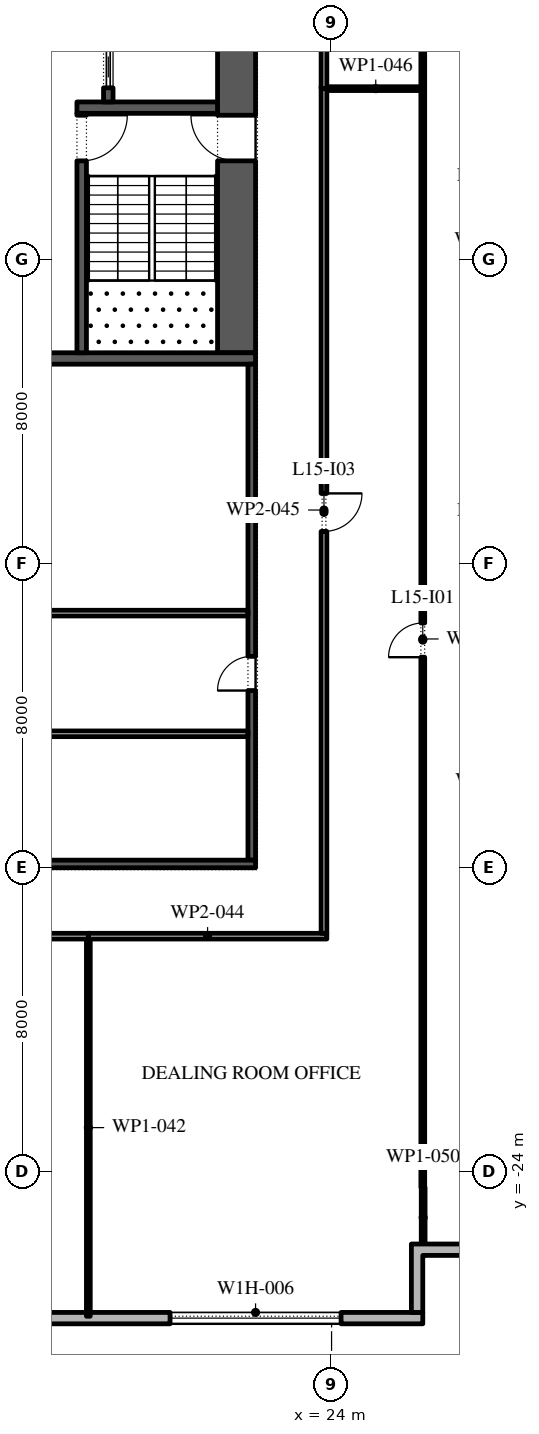
"""IFC4 building model, lengths in metres.
Left out: names, types, materials, properties, quantities, classifications, styles, units other than length and angle.
Written with IfcOpenShell. Run it as: python <this file> out.ifc"""

import sys

from ifc_helpers import new_model, si_unit, direction, frame, frame_2d, origin, place, context, subcontext, project, spatial, polyline, rectangle, outline, extrude, element, fill, save


model = new_model("IFC4")
c1 = context("Model", 3, precision=1e-05, world=origin(), true_north=direction((0.0, 1.0)))
c2 = subcontext(c1, "Body", "Model", "MODEL_VIEW")
j1 = project(units=[si_unit("LENGTHUNIT", "METRE"), si_unit("PLANEANGLEUNIT", "RADIAN")], contexts=[c1])
p1 = place(None, origin())
s1 = spatial("IfcSite", under=j1, at=p1, CompositionType="ELEMENT")
p2 = place(p1, origin())
s2 = spatial("IfcBuilding", under=s1, at=p2, CompositionType="ELEMENT")
p3 = place(p2, frame((0.0, 0.0, 73.2)))
s3 = spatial("IfcBuildingStorey", under=s2, at=p3, CompositionType="ELEMENT", Elevation=73.2)
p4 = place(p3, frame((-26.1, -27.85, 0.0), z_axis=(0.0, 0.0, 1.0), x_axis=(1.0, 0.0, 0.0)))
e1 = element("IfcWall", 1, at=p4, inside=s3, PredefinedType="STANDARD", context=c2, shape_type="SweptSolid", body=[
    extrude(rectangle(XDim=52.5, YDim=0.3, at=frame_2d((26.25, 0.0))), origin(), (0.0, 0.0, 1.0), 4.0),
])
p5 = place(p4, frame((2.0, 0.0, 0.45)))
e2 = element("IfcOpeningElement", 2, at=p5, cuts=e1, PredefinedType="OPENING", context=c2, shape_type="SweptSolid", body=[
    extrude(rectangle(XDim=4.5, YDim=2.75, at=frame_2d((2.25, 1.375))), frame((0.0, 0.16, 0.0), z_axis=(0.0, -1.0, 0.0), x_axis=(1.0, 0.0, 0.0)), (0.0, 0.0, 1.0), 0.32),
])
p6 = place(p4, frame((10.65, 0.0, 0.45)))
e3 = element("IfcOpeningElement", 3, at=p6, cuts=e1, PredefinedType="OPENING", context=c2, shape_type="SweptSolid", body=[
    extrude(rectangle(XDim=4.5, YDim=2.75, at=frame_2d((2.25, 1.375))), frame((0.0, 0.16, 0.0), z_axis=(0.0, -1.0, 0.0), x_axis=(1.0, 0.0, 0.0)), (0.0, 0.0, 1.0), 0.32),
])
p7 = place(p4, frame((20.5, 0.0, 0.0)))
e4 = element("IfcOpeningElement", 4, at=p7, cuts=e1, PredefinedType="OPENING", context=c2, shape_type="SweptSolid", body=[
    extrude(rectangle(XDim=2.4, YDim=3.5, at=frame_2d((1.2, 1.75))), frame((0.0, 0.16, 0.0), z_axis=(0.0, -1.0, 0.0), x_axis=(1.0, 0.0, 0.0)), (0.0, 0.0, 1.0), 0.32),
])
p8 = place(p4, frame((28.25, 0.0, 0.45)))
e5 = element("IfcOpeningElement", 5, at=p8, cuts=e1, PredefinedType="OPENING", context=c2, shape_type="SweptSolid", body=[
    extrude(rectangle(XDim=4.5, YDim=2.75, at=frame_2d((2.25, 1.375))), frame((0.0, 0.16, 0.0), z_axis=(0.0, -1.0, 0.0), x_axis=(1.0, 0.0, 0.0)), (0.0, 0.0, 1.0), 0.32),
])
p9 = place(p4, frame((37.05, 0.0, 0.45)))
e6 = element("IfcOpeningElement", 6, at=p9, cuts=e1, PredefinedType="OPENING", context=c2, shape_type="SweptSolid", body=[
    extrude(rectangle(XDim=4.5, YDim=2.75, at=frame_2d((2.25, 1.375))), frame((0.0, 0.16, 0.0), z_axis=(0.0, -1.0, 0.0), x_axis=(1.0, 0.0, 0.0)), (0.0, 0.0, 1.0), 0.32),
])
p10 = place(p4, frame((45.85, 0.0, 0.45)))
e7 = element("IfcOpeningElement", 7, at=p10, cuts=e1, PredefinedType="OPENING", context=c2, shape_type="SweptSolid", body=[
    extrude(rectangle(XDim=4.5, YDim=2.75, at=frame_2d((2.25, 1.375))), frame((0.0, 0.16, 0.0), z_axis=(0.0, -1.0, 0.0), x_axis=(1.0, 0.0, 0.0)), (0.0, 0.0, 1.0), 0.32),
])
p11 = place(p3, origin())
e8 = element("IfcWall", 8, at=p11, inside=s3, PredefinedType="STANDARD", context=c2, shape_type="SweptSolid", body=[
    extrude(outline(polyline([(27.9, -25.9), (27.9, -24.1), (30.0, -24.1), (30.0, -24.4), (28.2, -24.4), (28.2, -26.2), (26.4, -26.2), (26.4, -27.7), (26.1, -27.7), (26.1, -25.9), (27.9, -25.9)])), origin(), (0.0, 0.0, 1.0), 4.0),
])
p12 = place(p3, frame((21.5, -2.45, 0.0), z_axis=(0.0, 0.0, 1.0), x_axis=(0.0, 1.0, 0.0)))
e9 = element("IfcWall", 9, at=p12, inside=s3, PredefinedType="SHEAR", context=c2, shape_type="SweptSolid", body=[
    extrude(rectangle(XDim=27.9, YDim=1.0, at=frame_2d((13.95, 0.0))), origin(), (0.0, 0.0, 1.0), 4.0),
])
p13 = place(p12, frame((5.05, 0.0, 0.0)))
e10 = element("IfcOpeningElement", 10, at=p13, cuts=e9, PredefinedType="OPENING", context=c2, shape_type="SweptSolid", body=[
    extrude(rectangle(XDim=1.2, YDim=2.1, at=frame_2d((0.6, 1.05))), frame((0.0, 0.51, 0.0), z_axis=(0.0, -1.0, 0.0), x_axis=(1.0, 0.0, 0.0)), (0.0, 0.0, 1.0), 1.02),
])
p14 = place(p12, frame((21.65, 0.0, 0.0)))
e11 = element("IfcOpeningElement", 11, at=p14, cuts=e9, PredefinedType="OPENING", context=c2, shape_type="SweptSolid", body=[
    extrude(rectangle(XDim=1.2, YDim=2.1, at=frame_2d((0.6, 1.05))), frame((0.0, 0.51, 0.0), z_axis=(0.0, -1.0, 0.0), x_axis=(1.0, 0.0, 0.0)), (0.0, 0.0, 1.0), 1.02),
])
p15 = place(p3, frame((10.0, -2.6, 0.0), z_axis=(0.0, 0.0, 1.0), x_axis=(1.0, 0.0, 0.0)))
e12 = element("IfcWall", 12, at=p15, inside=s3, PredefinedType="SHEAR", context=c2, shape_type="SweptSolid", body=[
    extrude(rectangle(XDim=12.0, YDim=0.3, at=frame_2d((6.0, 0.0))), origin(), (0.0, 0.0, 1.0), 4.0),
])
p16 = place(p3, frame((17.3, 4.0, 0.0), z_axis=(0.0, 0.0, 1.0), x_axis=(1.0, 0.0, 0.0)))
e13 = element("IfcWall", 13, at=p16, inside=s3, PredefinedType="SHEAR", context=c2, shape_type="SweptSolid", body=[
    extrude(rectangle(XDim=3.7, YDim=0.3, at=frame_2d((1.85, 0.0))), origin(), (0.0, 0.0, 1.0), 4.0),
])
p17 = place(p3, frame((17.425, -2.45, 0.0), z_axis=(0.0, 0.0, 1.0), x_axis=(0.0, 1.0, 0.0)))
e14 = element("IfcWall", 14, at=p17, inside=s3, PredefinedType="SHEAR", context=c2, shape_type="SweptSolid", body=[
    extrude(rectangle(XDim=6.3, YDim=0.25, at=frame_2d((3.15, 0.0))), origin(), (0.0, 0.0, 1.0), 4.0),
])
p18 = place(p17, frame((5.05, 0.0, 0.0)))
e15 = element("IfcOpeningElement", 15, at=p18, cuts=e14, PredefinedType="OPENING", context=c2, shape_type="SweptSolid", body=[
    extrude(rectangle(XDim=1.2, YDim=2.1, at=frame_2d((0.6, 1.05))), frame((0.0, 0.135, 0.0), z_axis=(0.0, -1.0, 0.0), x_axis=(1.0, 0.0, 0.0)), (0.0, 0.0, 1.0), 0.27),
])
p19 = place(p3, frame((18.125, 4.15, 0.0), z_axis=(0.0, 0.0, 1.0), x_axis=(0.0, 1.0, 0.0)))
e16 = element("IfcWall", 16, at=p19, inside=s3, PredefinedType="SHEAR", context=c2, shape_type="SweptSolid", body=[
    extrude(rectangle(XDim=14.7, YDim=0.25, at=frame_2d((7.35, 0.0))), origin(), (0.0, 0.0, 1.0), 4.0),
])
p20 = place(p19, frame((0.371, 0.0, 0.0)))
e17 = element("IfcOpeningElement", 17, at=p20, cuts=e16, PredefinedType="OPENING", context=c2, shape_type="SweptSolid", body=[
    extrude(rectangle(XDim=1.1, YDim=2.1, at=frame_2d((0.55, 1.05))), frame((0.0, 0.135, 0.0), z_axis=(0.0, -1.0, 0.0), x_axis=(1.0, 0.0, 0.0)), (0.0, 0.0, 1.0), 0.27),
])
p21 = place(p19, frame((2.514, 0.0, 0.0)))
e18 = element("IfcOpeningElement", 18, at=p21, cuts=e16, PredefinedType="OPENING", context=c2, shape_type="SweptSolid", body=[
    extrude(rectangle(XDim=1.1, YDim=2.1, at=frame_2d((0.55, 1.05))), frame((0.0, 0.135, 0.0), z_axis=(0.0, -1.0, 0.0), x_axis=(1.0, 0.0, 0.0)), (0.0, 0.0, 1.0), 0.27),
])
p22 = place(p19, frame((4.657, 0.0, 0.0)))
e19 = element("IfcOpeningElement", 19, at=p22, cuts=e16, PredefinedType="OPENING", context=c2, shape_type="SweptSolid", body=[
    extrude(rectangle(XDim=1.1, YDim=2.1, at=frame_2d((0.55, 1.05))), frame((0.0, 0.135, 0.0), z_axis=(0.0, -1.0, 0.0), x_axis=(1.0, 0.0, 0.0)), (0.0, 0.0, 1.0), 0.27),
])
p23 = place(p19, frame((6.8, 0.0, 0.0)))
e20 = element("IfcOpeningElement", 20, at=p23, cuts=e16, PredefinedType="OPENING", context=c2, shape_type="SweptSolid", body=[
    extrude(rectangle(XDim=1.1, YDim=2.1, at=frame_2d((0.55, 1.05))), frame((0.0, 0.135, 0.0), z_axis=(0.0, -1.0, 0.0), x_axis=(1.0, 0.0, 0.0)), (0.0, 0.0, 1.0), 0.27),
])
p24 = place(p19, frame((8.943, 0.0, 0.0)))
e21 = element("IfcOpeningElement", 21, at=p24, cuts=e16, PredefinedType="OPENING", context=c2, shape_type="SweptSolid", body=[
    extrude(rectangle(XDim=1.1, YDim=2.1, at=frame_2d((0.55, 1.05))), frame((0.0, 0.135, 0.0), z_axis=(0.0, -1.0, 0.0), x_axis=(1.0, 0.0, 0.0)), (0.0, 0.0, 1.0), 0.27),
])
p25 = place(p19, frame((11.086, 0.0, 0.0)))
e22 = element("IfcOpeningElement", 22, at=p25, cuts=e16, PredefinedType="OPENING", context=c2, shape_type="SweptSolid", body=[
    extrude(rectangle(XDim=1.1, YDim=2.1, at=frame_2d((0.55, 1.05))), frame((0.0, 0.135, 0.0), z_axis=(0.0, -1.0, 0.0), x_axis=(1.0, 0.0, 0.0)), (0.0, 0.0, 1.0), 0.27),
])
p26 = place(p19, frame((13.229, 0.0, 0.0)))
e23 = element("IfcOpeningElement", 23, at=p26, cuts=e16, PredefinedType="OPENING", context=c2, shape_type="SweptSolid", body=[
    extrude(rectangle(XDim=1.1, YDim=2.1, at=frame_2d((0.55, 1.05))), frame((0.0, 0.135, 0.0), z_axis=(0.0, -1.0, 0.0), x_axis=(1.0, 0.0, 0.0)), (0.0, 0.0, 1.0), 0.27),
])
p27 = place(p3, frame((21.9, -15.8, 0.0), z_axis=(0.0, 0.0, 1.0), x_axis=(0.0, 1.0, 0.0)))
e24 = element("IfcWall", 24, at=p27, inside=s3, PredefinedType="SHEAR", context=c2, shape_type="SweptSolid", body=[
    extrude(rectangle(XDim=13.05, YDim=0.2, at=frame_2d((6.525, 0.0))), origin(), (0.0, 0.0, 1.0), 4.0),
])
p28 = place(p27, frame((4.462, 0.0, 0.0)))
e25 = element("IfcOpeningElement", 25, at=p28, cuts=e24, PredefinedType="OPENING", context=c2, shape_type="SweptSolid", body=[
    extrude(rectangle(XDim=0.9, YDim=2.1, at=frame_2d((0.45, 1.05))), frame((0.0, 0.11, 0.0), z_axis=(0.0, -1.0, 0.0), x_axis=(1.0, 0.0, 0.0)), (0.0, 0.0, 1.0), 0.22),
])
p29 = place(p3, frame((10.0, -15.9, 0.0), z_axis=(0.0, 0.0, 1.0), x_axis=(1.0, 0.0, 0.0)))
e26 = element("IfcWall", 26, at=p29, inside=s3, PredefinedType="SHEAR", context=c2, shape_type="SweptSolid", body=[
    extrude(rectangle(XDim=12.0, YDim=0.2, at=frame_2d((6.0, 0.0))), origin(), (0.0, 0.0, 1.0), 4.0),
])
for number, where, z_axis, x_axis in (
    (27, (10.2, -9.3, 0.0), (0.0, 0.0, 1.0), (1.0, 0.0, 0.0)),
    (28, (10.2, -12.475, 0.0), (0.0, 0.0, 1.0), (1.0, 0.0, 0.0)),
):
    element("IfcWall", number, at=place(p3, frame(where, z_axis=z_axis, x_axis=x_axis)), inside=s3, PredefinedType="PARTITIONING", context=c2, shape_type="SweptSolid", body=[
        extrude(rectangle(XDim=11.6, YDim=0.15, at=frame_2d((5.8, 0.0))), origin(), (0.0, 0.0, 1.0), 4.0),
    ])
p30 = place(p3, frame((17.65, -17.8, 0.0), z_axis=(0.0, 0.0, 1.0), x_axis=(-1.0, 0.0, 0.0)))
e29 = element("IfcWall", 29, at=p30, inside=s3, PredefinedType="PARTITIONING", context=c2, shape_type="SweptSolid", body=[
    extrude(rectangle(XDim=8.8, YDim=0.15, at=frame_2d((4.4, 0.0))), origin(), (0.0, 0.0, 1.0), 4.0),
])
p31 = place(p30, frame((5.7, 0.0, 0.0)))
e30 = element("IfcOpeningElement", 30, at=p31, cuts=e29, PredefinedType="OPENING", context=c2, shape_type="SweptSolid", body=[
    extrude(rectangle(XDim=1.0, YDim=2.1, at=frame_2d((0.5, 1.05))), frame((0.0, 0.085, 0.0), z_axis=(0.0, -1.0, 0.0), x_axis=(1.0, 0.0, 0.0)), (0.0, 0.0, 1.0), 0.17),
])
p32 = place(p3, frame((17.6, -17.875, 0.0), z_axis=(0.0, 0.0, 1.0), x_axis=(0.0, -1.0, 0.0)))
e31 = element("IfcWall", 31, at=p32, inside=s3, PredefinedType="PARTITIONING", context=c2, shape_type="SweptSolid", body=[
    extrude(rectangle(XDim=9.925, YDim=0.1, at=frame_2d((4.962, 0.0))), origin(), (0.0, 0.0, 1.0), 4.0),
])
p33 = place(p3, frame((23.875, -17.8, 0.0), z_axis=(0.0, 0.0, 1.0), x_axis=(-1.0, 0.0, 0.0)))
e32 = element("IfcWall", 32, at=p33, inside=s3, PredefinedType="PARTITIONING", context=c2, shape_type="SweptSolid", body=[
    extrude(rectangle(XDim=6.275, YDim=0.15, at=frame_2d((3.137, 0.0))), origin(), (0.0, 0.0, 1.0), 4.0),
])
p34 = place(p3, frame((23.8, 4.55, 0.0), z_axis=(0.0, 0.0, 1.0), x_axis=(0.0, -1.0, 0.0)))
e33 = element("IfcWall", 33, at=p34, inside=s3, PredefinedType="PARTITIONING", context=c2, shape_type="SweptSolid", body=[
    extrude(rectangle(XDim=22.275, YDim=0.15, at=frame_2d((11.138, 0.0))), origin(), (0.0, 0.0, 1.0), 4.0),
])
p35 = place(p34, frame((10.7, 0.0, 0.0)))
e34 = element("IfcOpeningElement", 34, at=p35, cuts=e33, PredefinedType="OPENING", context=c2, shape_type="SweptSolid", body=[
    extrude(rectangle(XDim=1.0, YDim=2.1, at=frame_2d((0.5, 1.05))), frame((0.0, 0.085, 0.0), z_axis=(0.0, -1.0, 0.0), x_axis=(1.0, 0.0, 0.0)), (0.0, 0.0, 1.0), 0.17),
])
p36 = place(p3, frame((23.875, 4.5, 0.0), z_axis=(0.0, 0.0, 1.0), x_axis=(1.0, 0.0, 0.0)))
e35 = element("IfcWall", 35, at=p36, inside=s3, PredefinedType="PARTITIONING", context=c2, shape_type="SweptSolid", body=[
    extrude(rectangle(XDim=2.575, YDim=0.1, at=frame_2d((1.288, 0.0))), origin(), (0.0, 0.0, 1.0), 4.0),
])
p37 = place(p3, frame((23.8, 27.2, 0.0), z_axis=(0.0, 0.0, 1.0), x_axis=(0.0, -1.0, 0.0)))
e36 = element("IfcWall", 36, at=p37, inside=s3, PredefinedType="PARTITIONING", context=c2, shape_type="SweptSolid", body=[
    extrude(rectangle(XDim=22.7, YDim=0.15, at=frame_2d((11.35, 0.0))), origin(), (0.0, 0.0, 1.0), 4.0),
])
p38 = place(p37, frame((10.8, 0.0, 0.0)))
e37 = element("IfcOpeningElement", 37, at=p38, cuts=e36, PredefinedType="OPENING", context=c2, shape_type="SweptSolid", body=[
    extrude(rectangle(XDim=1.0, YDim=2.1, at=frame_2d((0.5, 1.05))), frame((0.0, 0.085, 0.0), z_axis=(0.0, -1.0, 0.0), x_axis=(1.0, 0.0, 0.0)), (0.0, 0.0, 1.0), 0.17),
])
p39 = place(p3, frame((26.4, -24.41, 0.0), z_axis=(0.0, 0.0, 1.0), x_axis=(0.0, 1.0, 0.0)))
e38 = element("IfcWall", 38, at=p39, inside=s3, PredefinedType="PARTITIONING", context=c2, shape_type="SweptSolid", body=[
    extrude(rectangle(XDim=28.86, YDim=0.1, at=frame_2d((14.43, 0.0))), origin(), (0.0, 0.0, 1.0), 4.0),
])
p40 = place(p39, frame((13.95, 0.0, 0.0)))
e39 = element("IfcOpeningElement", 39, at=p40, cuts=e38, PredefinedType="OPENING", context=c2, shape_type="SweptSolid", body=[
    extrude(rectangle(XDim=0.9, YDim=2.1, at=frame_2d((0.45, 1.05))), frame((0.0, 0.06, 0.0), z_axis=(0.0, -1.0, 0.0), x_axis=(1.0, 0.0, 0.0)), (0.0, 0.0, 1.0), 0.12),
])
p41 = place(p3, frame((26.4, 4.55, 0.0), z_axis=(0.0, 0.0, 1.0), x_axis=(0.0, 1.0, 0.0)))
e40 = element("IfcWall", 40, at=p41, inside=s3, PredefinedType="PARTITIONING", context=c2, shape_type="SweptSolid", body=[
    extrude(rectangle(XDim=20.86, YDim=0.1, at=frame_2d((10.43, 0.0))), origin(), (0.0, 0.0, 1.0), 4.0),
])
p42 = place(p3, frame((26.41, -26.0, 0.0), z_axis=(0.0, 0.0, 1.0), x_axis=(0.0, 1.0, 0.0)))
e41 = element("IfcWall", 41, at=p42, inside=s3, PredefinedType="PARTITIONING", context=c2, shape_type="SweptSolid", body=[
    extrude(rectangle(XDim=1.59, YDim=0.1, at=frame_2d((0.795, 0.0))), origin(), (0.0, 0.0, 1.0), 4.0),
])
p43 = place(p10, origin())
e42 = element("IfcWindow", 42, at=p43, inside=s3, PartitioningType="DOUBLE_PANEL_VERTICAL", PredefinedType="WINDOW", context=c2, shape_type="SweptSolid", body=[
    extrude(rectangle(XDim=4.5, YDim=2.75, at=frame_2d((2.25, 1.375))), frame((0.0, 0.03, 0.0), z_axis=(0.0, -1.0, 0.0), x_axis=(1.0, 0.0, 0.0)), (0.0, 0.0, 1.0), 0.06),
])
fill(e7, e42)
p44 = place(p20, origin())
e43 = element("IfcDoor", 43, at=p44, inside=s3, OperationType="SLIDING_TO_LEFT", PredefinedType="DOOR", context=c2, shape_type="SweptSolid", body=[
    extrude(rectangle(XDim=1.1, YDim=2.1, at=frame_2d((0.55, 1.05))), frame((0.0, 0.025, 0.0), z_axis=(0.0, -1.0, 0.0), x_axis=(1.0, 0.0, 0.0)), (0.0, 0.0, 1.0), 0.05),
])
fill(e17, e43)
p45 = place(p18, frame((1.2, 0.0, 0.0), z_axis=(0.0, 0.0, 1.0), x_axis=(-1.0, 0.0, 0.0)))
e44 = element("IfcDoor", 44, at=p45, inside=s3, OperationType="SINGLE_SWING_RIGHT", PredefinedType="DOOR", context=c2, shape_type="SweptSolid", body=[
    extrude(rectangle(XDim=1.2, YDim=2.1, at=frame_2d((0.6, 1.05))), frame((0.0, 0.025, 0.0), z_axis=(0.0, -1.0, 0.0), x_axis=(1.0, 0.0, 0.0)), (0.0, 0.0, 1.0), 0.05),
])
fill(e15, e44)
p46 = place(p13, origin())
e45 = element("IfcDoor", 45, at=p46, inside=s3, OperationType="SINGLE_SWING_LEFT", PredefinedType="DOOR", context=c2, shape_type="SweptSolid", body=[
    extrude(rectangle(XDim=1.2, YDim=2.1, at=frame_2d((0.6, 1.05))), frame((0.0, 0.025, 0.0), z_axis=(0.0, -1.0, 0.0), x_axis=(1.0, 0.0, 0.0)), (0.0, 0.0, 1.0), 0.05),
])
fill(e10, e45)
p47 = place(p28, origin())
e46 = element("IfcDoor", 46, at=p47, inside=s3, OperationType="SINGLE_SWING_RIGHT", PredefinedType="DOOR", context=c2, shape_type="SweptSolid", body=[
    extrude(rectangle(XDim=0.9, YDim=2.1, at=frame_2d((0.45, 1.05))), frame((0.0, 0.1, 0.0), z_axis=(0.0, -1.0, 0.0), x_axis=(1.0, 0.0, 0.0)), (0.0, 0.0, 1.0), 0.05),
])
fill(e25, e46)
p48 = place(p40, origin())
e47 = element("IfcDoor", 47, at=p48, inside=s3, OperationType="SINGLE_SWING_RIGHT", PredefinedType="DOOR", context=c2, shape_type="SweptSolid", body=[
    extrude(rectangle(XDim=0.9, YDim=2.1, at=frame_2d((0.45, 1.05))), frame((0.0, 0.025, 0.0), z_axis=(0.0, -1.0, 0.0), x_axis=(1.0, 0.0, 0.0)), (0.0, 0.0, 1.0), 0.05),
])
fill(e39, e47)
p49 = place(p35, origin())
e48 = element("IfcDoor", 48, at=p49, inside=s3, OperationType="SINGLE_SWING_RIGHT", PredefinedType="DOOR", context=c2, shape_type="SweptSolid", body=[
    extrude(rectangle(XDim=1.0, YDim=2.1, at=frame_2d((0.5, 1.05))), frame((0.0, 0.025, 0.0), z_axis=(0.0, -1.0, 0.0), x_axis=(1.0, 0.0, 0.0)), (0.0, 0.0, 1.0), 0.05),
])
fill(e34, e48)
save(model, sys.argv[1])
